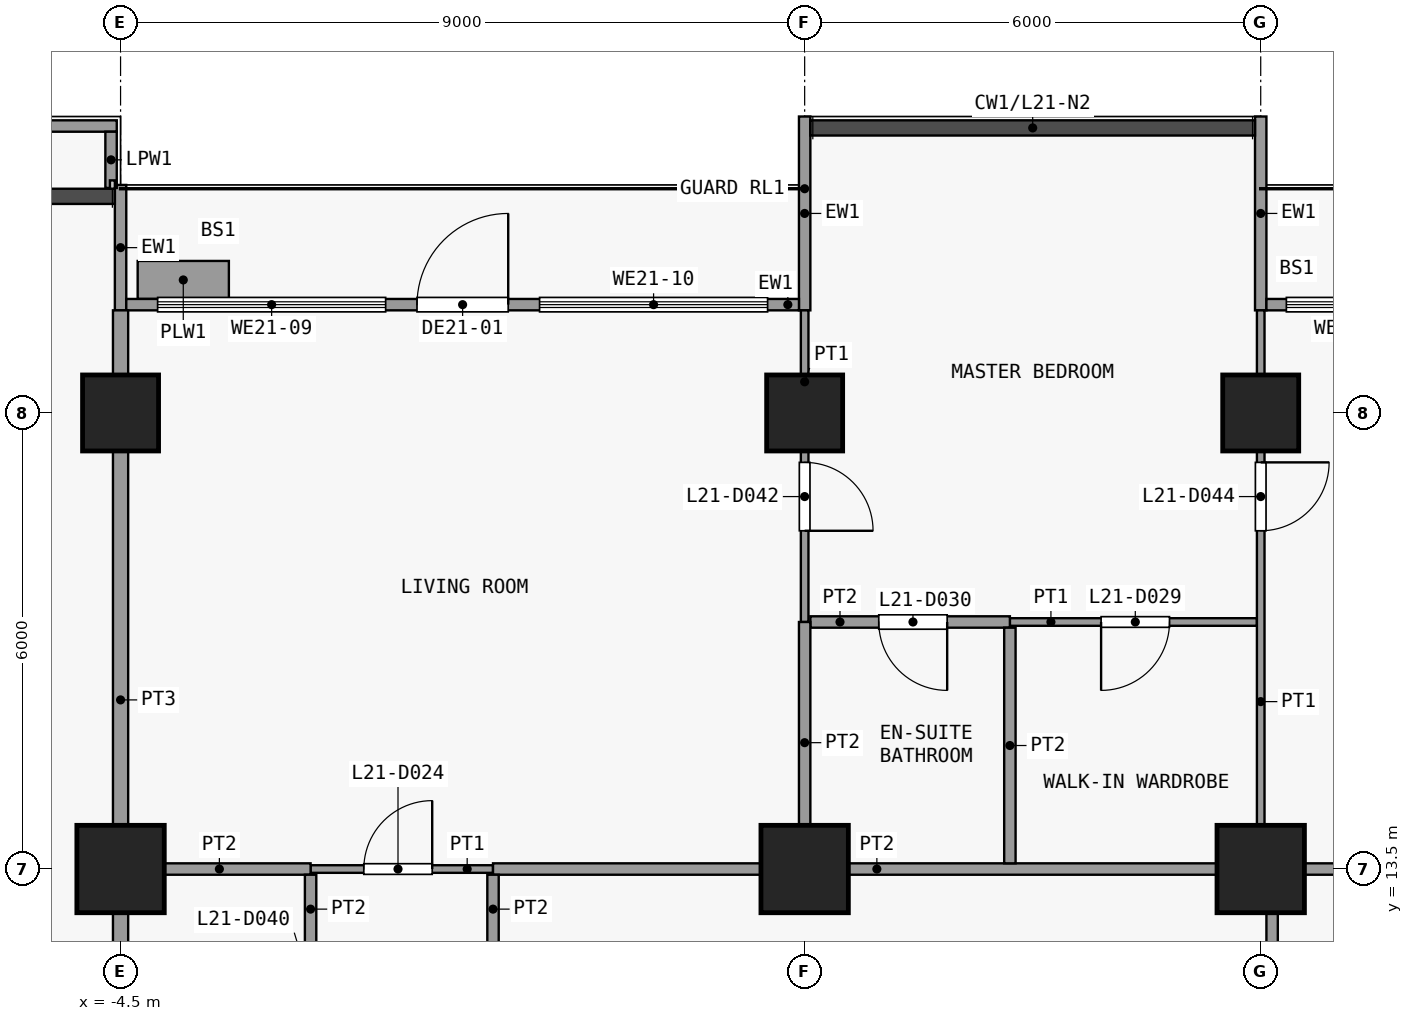
"""IFC4 building model, lengths in metres.
Left out: names, types, materials, properties, quantities, classifications, styles, units other than length and angle.
Written with IfcOpenShell. Run it as: python <this file> out.ifc"""

import sys

from ifc_helpers import new_model, si_unit, direction, frame, frame_2d, origin, origin_2d, place, context, subcontext, project, spatial, rectangle, extrude, element, fill, save


model = new_model("IFC4")
c1 = context("Model", 3, precision=1e-05, world=origin(), true_north=direction((0.0, 1.0)))
c2 = subcontext(c1, "Body", "Model", "MODEL_VIEW")
j1 = project(units=[si_unit("LENGTHUNIT", "METRE"), si_unit("PLANEANGLEUNIT", "RADIAN")], contexts=[c1])
p1 = place(None, origin())
s1 = spatial("IfcSite", under=j1, at=p1, CompositionType="ELEMENT")
p2 = place(p1, origin())
s2 = spatial("IfcBuilding", under=s1, at=p2, CompositionType="ELEMENT")
p3 = place(p2, frame((0.0, 0.0, 88.3)))
s3 = spatial("IfcBuildingStorey", under=s2, at=p3, CompositionType="ELEMENT", Elevation=88.3)
p4 = place(p3, frame((-4.5, 13.5, 0.0), z_axis=(0.0, 0.0, 1.0), x_axis=(1.0, 0.0, 0.0)))
e1 = element("IfcColumn", 1, at=p4, inside=s3, PredefinedType="COLUMN", context=c2, shape_type="SweptSolid", body=[
    extrude(rectangle(XDim=1.15, YDim=1.15, at=origin_2d()), origin(), (0.0, 0.0, 1.0), 3.6),
])
p5 = place(p3, frame((-4.5, 19.5, 0.0), z_axis=(0.0, 0.0, 1.0), x_axis=(1.0, 0.0, 0.0)))
e2 = element("IfcColumn", 2, at=p5, inside=s3, PredefinedType="COLUMN", context=c2, shape_type="SweptSolid", body=[
    extrude(rectangle(XDim=1.0, YDim=1.0, at=origin_2d()), origin(), (0.0, 0.0, 1.0), 3.6),
])
p6 = place(p3, frame((4.5, 13.5, 0.0), z_axis=(0.0, 0.0, 1.0), x_axis=(1.0, 0.0, 0.0)))
e3 = element("IfcColumn", 3, at=p6, inside=s3, PredefinedType="COLUMN", context=c2, shape_type="SweptSolid", body=[
    extrude(rectangle(XDim=1.15, YDim=1.15, at=origin_2d()), origin(), (0.0, 0.0, 1.0), 3.6),
])
p7 = place(p3, frame((4.5, 19.5, 0.0), z_axis=(0.0, 0.0, 1.0), x_axis=(1.0, 0.0, 0.0)))
e4 = element("IfcColumn", 4, at=p7, inside=s3, PredefinedType="COLUMN", context=c2, shape_type="SweptSolid", body=[
    extrude(rectangle(XDim=1.0, YDim=1.0, at=origin_2d()), origin(), (0.0, 0.0, 1.0), 3.6),
])
p8 = place(p3, frame((10.5, 13.5, 0.0), z_axis=(0.0, 0.0, 1.0), x_axis=(1.0, 0.0, 0.0)))
e5 = element("IfcColumn", 5, at=p8, inside=s3, PredefinedType="COLUMN", context=c2, shape_type="SweptSolid", body=[
    extrude(rectangle(XDim=1.15, YDim=1.15, at=origin_2d()), origin(), (0.0, 0.0, 1.0), 3.6),
])
p9 = place(p3, frame((10.5, 19.5, 0.0), z_axis=(0.0, 0.0, 1.0), x_axis=(1.0, 0.0, 0.0)))
e6 = element("IfcColumn", 6, at=p9, inside=s3, PredefinedType="COLUMN", context=c2, shape_type="SweptSolid", body=[
    extrude(rectangle(XDim=1.0, YDim=1.0, at=origin_2d()), origin(), (0.0, 0.0, 1.0), 3.6),
])
p10 = place(p3, frame((-4.5, 20.85, 0.0), z_axis=(0.0, 0.0, 1.0), x_axis=(0.0, 1.0, 0.0)))
e7 = element("IfcWall", 7, at=p10, inside=s3, PredefinedType="SOLIDWALL", context=c2, shape_type="SweptSolid", body=[
    extrude(rectangle(XDim=1.65, YDim=0.15, at=frame_2d((0.825, 0.0))), origin(), (0.0, 0.0, 1.0), 3.3),
])
p11 = place(p3, frame((4.5, 20.85, 0.0), z_axis=(0.0, 0.0, 1.0), x_axis=(0.0, 1.0, 0.0)))
e8 = element("IfcWall", 8, at=p11, inside=s3, PredefinedType="SOLIDWALL", context=c2, shape_type="SweptSolid", body=[
    extrude(rectangle(XDim=2.55, YDim=0.15, at=frame_2d((1.275, 0.0))), origin(), (0.0, 0.0, 1.0), 3.3),
])
p12 = place(p3, frame((-4.425, 20.925, 0.0), z_axis=(0.0, 0.0, 1.0), x_axis=(1.0, 0.0, 0.0)))
e9 = element("IfcWall", 9, at=p12, inside=s3, PredefinedType="SOLIDWALL", context=c2, shape_type="SweptSolid", body=[
    extrude(rectangle(XDim=8.85, YDim=0.15, at=frame_2d((4.425, 0.0))), origin(), (0.0, 0.0, 1.0), 3.3),
])
p13 = place(p12, frame((3.825, 0.0, 0.0)))
e10 = element("IfcOpeningElement", 10, at=p13, cuts=e9, PredefinedType="OPENING", context=c2, shape_type="SweptSolid", body=[
    extrude(rectangle(XDim=1.2, YDim=2.4, at=frame_2d((0.6, 1.2))), frame((0.0, 0.085, 0.0), z_axis=(0.0, -1.0, 0.0), x_axis=(1.0, 0.0, 0.0)), (0.0, 0.0, 1.0), 0.17),
])
p14 = place(p12, frame((0.413, 0.0, 0.9)))
e11 = element("IfcOpeningElement", 11, at=p14, cuts=e9, PredefinedType="OPENING", context=c2, shape_type="SweptSolid", body=[
    extrude(rectangle(XDim=3.0, YDim=2.1, at=frame_2d((1.5, 1.05))), frame((0.0, 0.085, 0.0), z_axis=(0.0, -1.0, 0.0), x_axis=(1.0, 0.0, 0.0)), (0.0, 0.0, 1.0), 0.17),
])
p15 = place(p12, frame((5.438, 0.0, 0.9)))
e12 = element("IfcOpeningElement", 12, at=p15, cuts=e9, PredefinedType="OPENING", context=c2, shape_type="SweptSolid", body=[
    extrude(rectangle(XDim=3.0, YDim=2.1, at=frame_2d((1.5, 1.05))), frame((0.0, 0.085, 0.0), z_axis=(0.0, -1.0, 0.0), x_axis=(1.0, 0.0, 0.0)), (0.0, 0.0, 1.0), 0.17),
])
p16 = place(p3, frame((-4.275, 21.25, 0.0), z_axis=(0.0, 0.0, 1.0), x_axis=(1.0, 0.0, 0.0)))
e13 = element("IfcWall", 13, at=p16, inside=s3, PredefinedType="USERDEFINED", context=c2, shape_type="SweptSolid", body=[
    extrude(rectangle(XDim=1.2, YDim=0.5, at=frame_2d((0.6, 0.0))), origin(), (0.0, 0.0, 1.0), 0.9),
])
p17 = place(p3, frame((10.5, 20.85, 0.0), z_axis=(0.0, 0.0, 1.0), x_axis=(0.0, 1.0, 0.0)))
e14 = element("IfcWall", 14, at=p17, inside=s3, PredefinedType="SOLIDWALL", context=c2, shape_type="SweptSolid", body=[
    extrude(rectangle(XDim=2.55, YDim=0.15, at=frame_2d((1.275, 0.0))), origin(), (0.0, 0.0, 1.0), 3.3),
])
p18 = place(p3, frame((10.575, 20.925, 0.0), z_axis=(0.0, 0.0, 1.0), x_axis=(1.0, 0.0, 0.0)))
e15 = element("IfcWall", 15, at=p18, inside=s3, PredefinedType="SOLIDWALL", context=c2, shape_type="SweptSolid", body=[
    extrude(rectangle(XDim=5.85, YDim=0.15, at=frame_2d((2.925, 0.0))), origin(), (0.0, 0.0, 1.0), 3.3),
])
p19 = place(p18, frame((2.325, 0.0, 0.0)))
e16 = element("IfcOpeningElement", 16, at=p19, cuts=e15, PredefinedType="OPENING", context=c2, shape_type="SweptSolid", body=[
    extrude(rectangle(XDim=1.2, YDim=2.4, at=frame_2d((0.6, 1.2))), frame((0.0, 0.085, 0.0), z_axis=(0.0, -1.0, 0.0), x_axis=(1.0, 0.0, 0.0)), (0.0, 0.0, 1.0), 0.17),
])
p20 = place(p18, frame((0.262, 0.0, 0.9)))
e17 = element("IfcOpeningElement", 17, at=p20, cuts=e15, PredefinedType="OPENING", context=c2, shape_type="SweptSolid", body=[
    extrude(rectangle(XDim=1.8, YDim=2.1, at=frame_2d((0.9, 1.05))), frame((0.0, 0.085, 0.0), z_axis=(0.0, -1.0, 0.0), x_axis=(1.0, 0.0, 0.0)), (0.0, 0.0, 1.0), 0.17),
])
p21 = place(p18, frame((3.788, 0.0, 0.9)))
e18 = element("IfcOpeningElement", 18, at=p21, cuts=e15, PredefinedType="OPENING", context=c2, shape_type="SweptSolid", body=[
    extrude(rectangle(XDim=1.8, YDim=2.1, at=frame_2d((0.9, 1.05))), frame((0.0, 0.085, 0.0), z_axis=(0.0, -1.0, 0.0), x_axis=(1.0, 0.0, 0.0)), (0.0, 0.0, 1.0), 0.17),
])
p22 = place(p3, frame((-10.3, 23.275, 0.0), z_axis=(0.0, 0.0, 1.0), x_axis=(1.0, 0.0, 0.0)))
e19 = element("IfcWall", 19, at=p22, inside=s3, PredefinedType="PARAPET", context=c2, shape_type="SweptSolid", body=[
    extrude(rectangle(XDim=5.75, YDim=0.15, at=frame_2d((2.875, 0.0))), origin(), (0.0, 0.0, 1.0), 1.15),
])
p23 = place(p3, frame((-4.625, 23.2, 0.0), z_axis=(0.0, 0.0, 1.0), x_axis=(0.0, -1.0, 0.0)))
e20 = element("IfcWall", 20, at=p23, inside=s3, PredefinedType="PARAPET", context=c2, shape_type="SweptSolid", body=[
    extrude(rectangle(XDim=0.74, YDim=0.15, at=frame_2d((0.37, 0.0))), origin(), (0.0, 0.0, 1.0), 1.15),
])
p24 = place(p3, frame((-2.0, 13.5, 0.0), z_axis=(0.0, 0.0, 1.0), x_axis=(1.0, 0.0, 0.0)))
e21 = element("IfcWall", 21, at=p24, inside=s3, PredefinedType="PARTITIONING", context=c2, shape_type="SweptSolid", body=[
    extrude(rectangle(XDim=2.4, YDim=0.1, at=frame_2d((1.2, 0.0))), origin(), (0.0, 0.0, 1.0), 3.3),
])
p25 = place(p24, frame((0.7, 0.0, 0.0)))
e22 = element("IfcOpeningElement", 22, at=p25, cuts=e21, PredefinedType="OPENING", context=c2, shape_type="SweptSolid", body=[
    extrude(rectangle(XDim=0.9, YDim=2.1, at=frame_2d((0.45, 1.05))), frame((0.0, 0.06, 0.0), z_axis=(0.0, -1.0, 0.0), x_axis=(1.0, 0.0, 0.0)), (0.0, 0.0, 1.0), 0.12),
])
p26 = place(p3, frame((-4.4, 13.5, 0.0), z_axis=(0.0, 0.0, 1.0), x_axis=(1.0, 0.0, 0.0)))
e23 = element("IfcWall", 23, at=p26, inside=s3, PredefinedType="PARTITIONING", context=c2, shape_type="SweptSolid", body=[
    extrude(rectangle(XDim=2.4, YDim=0.15, at=frame_2d((1.2, 0.0))), origin(), (0.0, 0.0, 1.0), 3.3),
])
p27 = place(p3, frame((0.4, 13.5, 0.0), z_axis=(0.0, 0.0, 1.0), x_axis=(1.0, 0.0, 0.0)))
e24 = element("IfcWall", 24, at=p27, inside=s3, PredefinedType="PARTITIONING", context=c2, shape_type="SweptSolid", body=[
    extrude(rectangle(XDim=10.1, YDim=0.15, at=frame_2d((5.05, 0.0))), origin(), (0.0, 0.0, 1.0), 3.3),
])
p28 = place(p3, frame((10.65, 13.5, 0.0), z_axis=(0.0, 0.0, 1.0), x_axis=(1.0, 0.0, 0.0)))
e25 = element("IfcWall", 25, at=p28, inside=s3, PredefinedType="PARTITIONING", context=c2, shape_type="SweptSolid", body=[
    extrude(rectangle(XDim=8.35, YDim=0.15, at=frame_2d((4.175, 0.0))), origin(), (0.0, 0.0, 1.0), 3.3),
])
p29 = place(p3, frame((7.2, 16.75, 0.0), z_axis=(0.0, 0.0, 1.0), x_axis=(1.0, 0.0, 0.0)))
e26 = element("IfcWall", 26, at=p29, inside=s3, PredefinedType="PARTITIONING", context=c2, shape_type="SweptSolid", body=[
    extrude(rectangle(XDim=3.25, YDim=0.1, at=frame_2d((1.625, 0.0))), origin(), (0.0, 0.0, 1.0), 3.3),
])
p30 = place(p29, frame((1.2, 0.0, 0.0)))
e27 = element("IfcOpeningElement", 27, at=p30, cuts=e26, PredefinedType="OPENING", context=c2, shape_type="SweptSolid", body=[
    extrude(rectangle(XDim=0.9, YDim=2.1, at=frame_2d((0.45, 1.05))), frame((0.0, 0.06, 0.0), z_axis=(0.0, -1.0, 0.0), x_axis=(1.0, 0.0, 0.0)), (0.0, 0.0, 1.0), 0.12),
])
p31 = place(p3, frame((4.575, 16.75, 0.0), z_axis=(0.0, 0.0, 1.0), x_axis=(1.0, 0.0, 0.0)))
e28 = element("IfcWall", 28, at=p31, inside=s3, PredefinedType="PARTITIONING", context=c2, shape_type="SweptSolid", body=[
    extrude(rectangle(XDim=2.625, YDim=0.15, at=frame_2d((1.312, 0.0))), origin(), (0.0, 0.0, 1.0), 3.3),
])
p32 = place(p31, frame((0.9, 0.0, 0.0)))
e29 = element("IfcOpeningElement", 29, at=p32, cuts=e28, PredefinedType="OPENING", context=c2, shape_type="SweptSolid", body=[
    extrude(rectangle(XDim=0.9, YDim=2.1, at=frame_2d((0.45, 1.05))), frame((0.0, 0.085, 0.0), z_axis=(0.0, -1.0, 0.0), x_axis=(1.0, 0.0, 0.0)), (0.0, 0.0, 1.0), 0.17),
])
p33 = place(p3, frame((-4.5, 10.6, 0.0), z_axis=(0.0, 0.0, 1.0), x_axis=(0.0, 1.0, 0.0)))
e30 = element("IfcWall", 30, at=p33, inside=s3, PredefinedType="PARTITIONING", context=c2, shape_type="SweptSolid", body=[
    extrude(rectangle(XDim=10.25, YDim=0.2, at=frame_2d((5.125, 0.0))), origin(), (0.0, 0.0, 1.0), 3.3),
])
p34 = place(p3, frame((-2.0, 10.6, 0.0), z_axis=(0.0, 0.0, 1.0), x_axis=(0.0, 1.0, 0.0)))
e31 = element("IfcWall", 31, at=p34, inside=s3, PredefinedType="PARTITIONING", context=c2, shape_type="SweptSolid", body=[
    extrude(rectangle(XDim=2.825, YDim=0.15, at=frame_2d((1.413, 0.0))), origin(), (0.0, 0.0, 1.0), 3.3),
])
p35 = place(p34, frame((0.9, 0.0, 0.0)))
e32 = element("IfcOpeningElement", 32, at=p35, cuts=e31, PredefinedType="OPENING", context=c2, shape_type="SweptSolid", body=[
    extrude(rectangle(XDim=0.9, YDim=2.1, at=frame_2d((0.45, 1.05))), frame((0.0, 0.085, 0.0), z_axis=(0.0, -1.0, 0.0), x_axis=(1.0, 0.0, 0.0)), (0.0, 0.0, 1.0), 0.17),
])
p36 = place(p3, frame((0.4, 10.6, 0.0), z_axis=(0.0, 0.0, 1.0), x_axis=(0.0, 1.0, 0.0)))
e33 = element("IfcWall", 33, at=p36, inside=s3, PredefinedType="PARTITIONING", context=c2, shape_type="SweptSolid", body=[
    extrude(rectangle(XDim=2.825, YDim=0.15, at=frame_2d((1.413, 0.0))), origin(), (0.0, 0.0, 1.0), 3.3),
])
p37 = place(p36, frame((0.9, 0.0, 0.0)))
e34 = element("IfcOpeningElement", 34, at=p37, cuts=e33, PredefinedType="OPENING", context=c2, shape_type="SweptSolid", body=[
    extrude(rectangle(XDim=0.9, YDim=2.1, at=frame_2d((0.45, 1.05))), frame((0.0, 0.085, 0.0), z_axis=(0.0, -1.0, 0.0), x_axis=(1.0, 0.0, 0.0)), (0.0, 0.0, 1.0), 0.17),
])
p38 = place(p3, frame((4.5, 16.75, 0.0), z_axis=(0.0, 0.0, 1.0), x_axis=(0.0, 1.0, 0.0)))
e35 = element("IfcWall", 35, at=p38, inside=s3, PredefinedType="PARTITIONING", context=c2, shape_type="SweptSolid", body=[
    extrude(rectangle(XDim=4.1, YDim=0.1, at=frame_2d((2.05, 0.0))), origin(), (0.0, 0.0, 1.0), 3.3),
])
p39 = place(p38, frame((1.2, 0.0, 0.0)))
e36 = element("IfcOpeningElement", 36, at=p39, cuts=e35, PredefinedType="OPENING", context=c2, shape_type="SweptSolid", body=[
    extrude(rectangle(XDim=0.9, YDim=2.1, at=frame_2d((0.45, 1.05))), frame((0.0, 0.06, 0.0), z_axis=(0.0, -1.0, 0.0), x_axis=(1.0, 0.0, 0.0)), (0.0, 0.0, 1.0), 0.12),
])
p40 = place(p3, frame((4.5, 13.575, 0.0), z_axis=(0.0, 0.0, 1.0), x_axis=(0.0, 1.0, 0.0)))
e37 = element("IfcWall", 37, at=p40, inside=s3, PredefinedType="PARTITIONING", context=c2, shape_type="SweptSolid", body=[
    extrude(rectangle(XDim=3.175, YDim=0.15, at=frame_2d((1.587, 0.0))), origin(), (0.0, 0.0, 1.0), 3.3),
])
p41 = place(p3, frame((7.2, 13.575, 0.0), z_axis=(0.0, 0.0, 1.0), x_axis=(0.0, 1.0, 0.0)))
e38 = element("IfcWall", 38, at=p41, inside=s3, PredefinedType="PARTITIONING", context=c2, shape_type="SweptSolid", body=[
    extrude(rectangle(XDim=3.1, YDim=0.15, at=frame_2d((1.55, 0.0))), origin(), (0.0, 0.0, 1.0), 3.3),
])
p42 = place(p3, frame((10.5, 13.575, 0.0), z_axis=(0.0, 0.0, 1.0), x_axis=(0.0, 1.0, 0.0)))
e39 = element("IfcWall", 39, at=p42, inside=s3, PredefinedType="PARTITIONING", context=c2, shape_type="SweptSolid", body=[
    extrude(rectangle(XDim=7.275, YDim=0.1, at=frame_2d((3.638, 0.0))), origin(), (0.0, 0.0, 1.0), 3.3),
])
p43 = place(p42, frame((4.375, 0.0, 0.0)))
e40 = element("IfcOpeningElement", 40, at=p43, cuts=e39, PredefinedType="OPENING", context=c2, shape_type="SweptSolid", body=[
    extrude(rectangle(XDim=0.9, YDim=2.1, at=frame_2d((0.45, 1.05))), frame((0.0, 0.06, 0.0), z_axis=(0.0, -1.0, 0.0), x_axis=(1.0, 0.0, 0.0)), (0.0, 0.0, 1.0), 0.12),
])
p44 = place(p3, frame((10.65, 10.6, 0.0), z_axis=(0.0, 0.0, 1.0), x_axis=(0.0, 1.0, 0.0)))
e41 = element("IfcWall", 41, at=p44, inside=s3, PredefinedType="PARTITIONING", context=c2, shape_type="SweptSolid", body=[
    extrude(rectangle(XDim=2.825, YDim=0.15, at=frame_2d((1.413, 0.0))), origin(), (0.0, 0.0, 1.0), 3.3),
])
p45 = place(p44, frame((1.0, 0.0, 0.0)))
e42 = element("IfcOpeningElement", 42, at=p45, cuts=e41, PredefinedType="OPENING", context=c2, shape_type="SweptSolid", body=[
    extrude(rectangle(XDim=0.9, YDim=2.1, at=frame_2d((0.45, 1.05))), frame((0.0, 0.085, 0.0), z_axis=(0.0, -1.0, 0.0), x_axis=(1.0, 0.0, 0.0)), (0.0, 0.0, 1.0), 0.17),
])
p46 = place(p13, origin())
e43 = element("IfcDoor", 43, at=p46, inside=s3, OperationType="SINGLE_SWING_RIGHT", PredefinedType="DOOR", context=c2, shape_type="SweptSolid", body=[
    extrude(rectangle(XDim=1.2, YDim=2.4, at=frame_2d((0.6, 1.2))), frame((0.0, 0.025, 0.0), z_axis=(0.0, -1.0, 0.0), x_axis=(1.0, 0.0, 0.0)), (0.0, 0.0, 1.0), 0.05),
])
fill(e10, e43)
p47 = place(p14, origin())
e44 = element("IfcWindow", 44, at=p47, inside=s3, PartitioningType="SINGLE_PANEL", PredefinedType="WINDOW", context=c2, shape_type="SweptSolid", body=[
    extrude(rectangle(XDim=3.0, YDim=2.1, at=frame_2d((1.5, 1.05))), frame((0.0, 0.03, 0.0), z_axis=(0.0, -1.0, 0.0), x_axis=(1.0, 0.0, 0.0)), (0.0, 0.0, 1.0), 0.06),
])
fill(e11, e44)
p48 = place(p15, origin())
e45 = element("IfcWindow", 45, at=p48, inside=s3, PartitioningType="SINGLE_PANEL", PredefinedType="WINDOW", context=c2, shape_type="SweptSolid", body=[
    extrude(rectangle(XDim=3.0, YDim=2.1, at=frame_2d((1.5, 1.05))), frame((0.0, 0.03, 0.0), z_axis=(0.0, -1.0, 0.0), x_axis=(1.0, 0.0, 0.0)), (0.0, 0.0, 1.0), 0.06),
])
fill(e12, e45)
p49 = place(p20, origin())
e46 = element("IfcWindow", 46, at=p49, inside=s3, PartitioningType="SINGLE_PANEL", PredefinedType="WINDOW", context=c2, shape_type="SweptSolid", body=[
    extrude(rectangle(XDim=1.8, YDim=2.1, at=frame_2d((0.9, 1.05))), frame((0.0, 0.03, 0.0), z_axis=(0.0, -1.0, 0.0), x_axis=(1.0, 0.0, 0.0)), (0.0, 0.0, 1.0), 0.06),
])
fill(e17, e46)
p50 = place(p25, origin())
e47 = element("IfcDoor", 47, at=p50, inside=s3, OperationType="SINGLE_SWING_LEFT", PredefinedType="DOOR", context=c2, shape_type="SweptSolid", body=[
    extrude(rectangle(XDim=0.9, YDim=2.1, at=frame_2d((0.45, 1.05))), frame((0.0, 0.025, 0.0), z_axis=(0.0, -1.0, 0.0), x_axis=(1.0, 0.0, 0.0)), (0.0, 0.0, 1.0), 0.05),
])
fill(e22, e47)
p51 = place(p30, origin())
e48 = element("IfcDoor", 48, at=p51, inside=s3, OperationType="SINGLE_SWING_LEFT", PredefinedType="DOOR", context=c2, shape_type="SweptSolid", body=[
    extrude(rectangle(XDim=0.9, YDim=2.1, at=frame_2d((0.45, 1.05))), frame((0.0, 0.025, 0.0), z_axis=(0.0, -1.0, 0.0), x_axis=(1.0, 0.0, 0.0)), (0.0, 0.0, 1.0), 0.05),
])
fill(e27, e48)
p52 = place(p32, origin())
e49 = element("IfcDoor", 49, at=p52, inside=s3, OperationType="SINGLE_SWING_RIGHT", PredefinedType="DOOR", context=c2, shape_type="SweptSolid", body=[
    extrude(rectangle(XDim=0.9, YDim=2.1, at=frame_2d((0.45, 1.05))), frame((0.0, 0.025, 0.0), z_axis=(0.0, -1.0, 0.0), x_axis=(1.0, 0.0, 0.0)), (0.0, 0.0, 1.0), 0.05),
])
fill(e29, e49)
p53 = place(p39, origin())
e50 = element("IfcDoor", 50, at=p53, inside=s3, OperationType="SINGLE_SWING_LEFT", PredefinedType="DOOR", context=c2, shape_type="SweptSolid", body=[
    extrude(rectangle(XDim=0.9, YDim=2.1, at=frame_2d((0.45, 1.05))), frame((0.0, 0.025, 0.0), z_axis=(0.0, -1.0, 0.0), x_axis=(1.0, 0.0, 0.0)), (0.0, 0.0, 1.0), 0.05),
])
fill(e36, e50)
p54 = place(p43, origin())
e51 = element("IfcDoor", 51, at=p54, inside=s3, OperationType="SINGLE_SWING_RIGHT", PredefinedType="DOOR", context=c2, shape_type="SweptSolid", body=[
    extrude(rectangle(XDim=0.9, YDim=2.1, at=frame_2d((0.45, 1.05))), frame((0.0, 0.025, 0.0), z_axis=(0.0, -1.0, 0.0), x_axis=(1.0, 0.0, 0.0)), (0.0, 0.0, 1.0), 0.05),
])
fill(e40, e51)
save(model, sys.argv[1])
